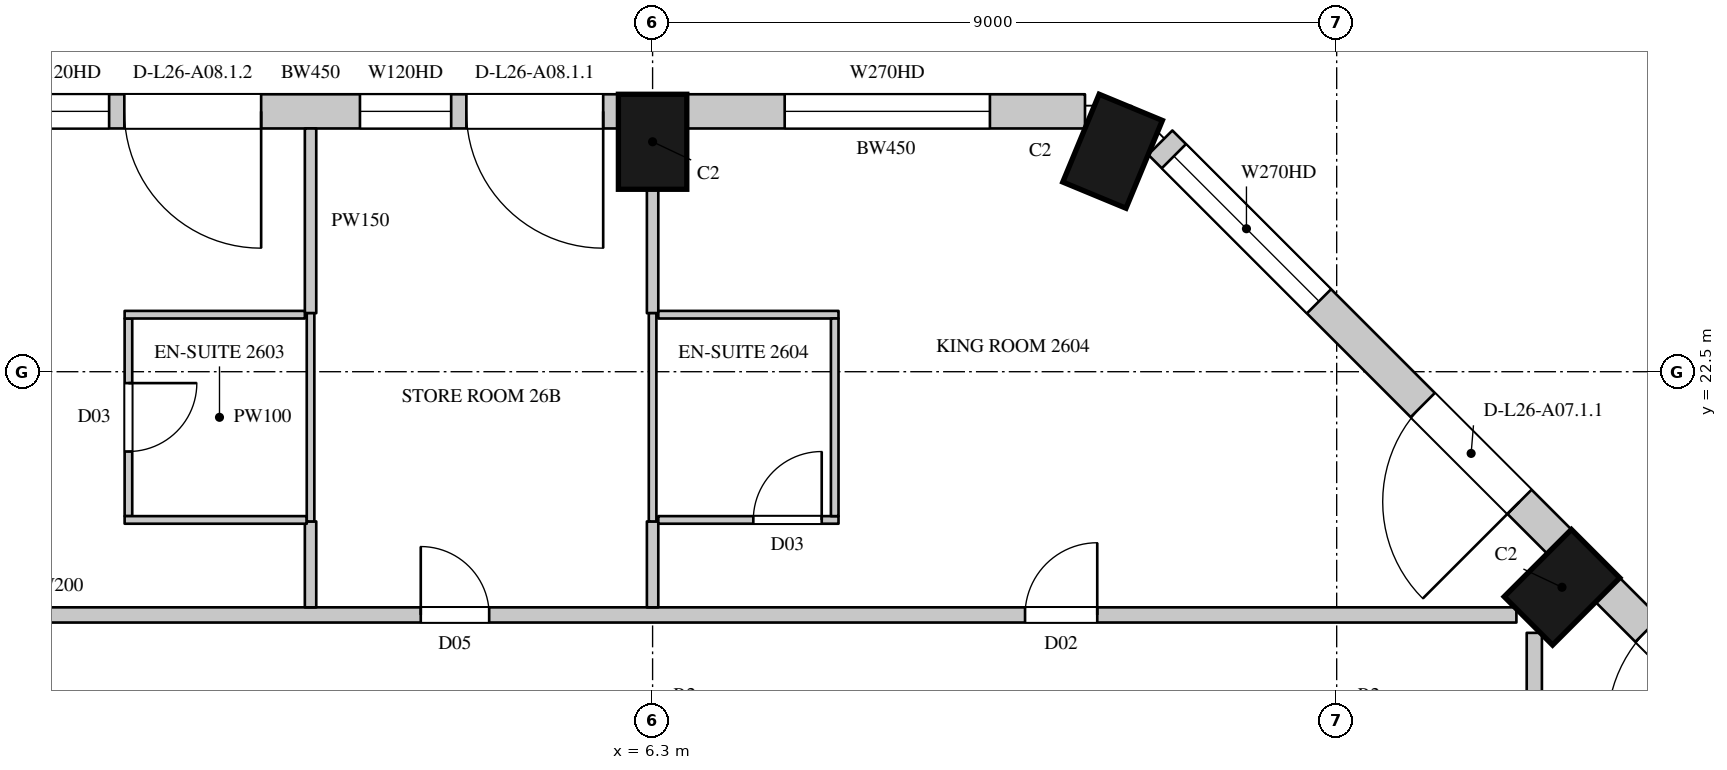
"""IFC4 building model, lengths in metres.
Left out: names, types, materials, properties, quantities, classifications, styles, units other than length and angle.
Written with IfcOpenShell. Run it as: python <this file> out.ifc"""

import sys

from ifc_helpers import new_model, si_unit, direction, frame, frame_2d, origin, origin_2d, place, context, subcontext, project, spatial, rectangle, extrude, element, fill, save


model = new_model("IFC4")
c1 = context("Model", 3, precision=1e-05, world=origin(), true_north=direction((0.0, 1.0)))
c2 = subcontext(c1, "Body", "Model", "MODEL_VIEW")
j1 = project(units=[si_unit("LENGTHUNIT", "METRE"), si_unit("PLANEANGLEUNIT", "RADIAN")], contexts=[c1])
p1 = place(None, origin())
s1 = spatial("IfcSite", under=j1, at=p1, CompositionType="ELEMENT")
p2 = place(p1, origin())
s2 = spatial("IfcBuilding", under=s1, at=p2, CompositionType="ELEMENT")
p3 = place(p2, frame((0.0, 0.0, 123.9)))
s3 = spatial("IfcBuildingStorey", under=s2, at=p3, CompositionType="ELEMENT", Elevation=123.9)
for number, where, z_axis, x_axis in (
    (1, (18.264, 19.664, 0.0), (0.0, 0.0, 1.0), (-0.707, 0.707, 0.0)),
    (2, (12.352, 25.4, 0.0), (0.0, 0.0, 1.0), (-0.924, 0.383, 0.0)),
    (3, (6.3, 25.525, 0.0), (0.0, 0.0, 1.0), (-1.0, 0.0, 0.0)),
):
    element("IfcColumn", number, at=place(p3, frame(where, z_axis=z_axis, x_axis=x_axis)), inside=s3, PredefinedType="COLUMN", context=c2, shape_type="SweptSolid", body=[
        extrude(rectangle(XDim=0.9, YDim=1.25, at=origin_2d()), origin(), (0.0, 0.0, 1.0), 3.6),
    ])
p4 = place(p3, frame((24.115, 14.379, 0.0), z_axis=(0.0, 0.0, 1.0), x_axis=(-0.707106781187, 0.707106781187, 0.0)))
e4 = element("IfcWall", 4, at=p4, inside=s3, PredefinedType="SOLIDWALL", context=c2, shape_type="SweptSolid", body=[
    extrude(rectangle(XDim=7.424, YDim=0.45, at=frame_2d((3.712, 0.0))), origin(), (0.0, 0.0, 1.0), 3.3),
])
p5 = place(p4, frame((0.253, 0.0, 1.05)))
e5 = element("IfcOpeningElement", 5, at=p5, cuts=e4, PredefinedType="OPENING", context=c2, shape_type="SweptSolid", body=[
    extrude(rectangle(XDim=2.7, YDim=2.0, at=frame_2d((1.35, 1.0))), frame((0.0, 0.235, 0.0), z_axis=(0.0, -1.0, 0.0), x_axis=(1.0, 0.0, 0.0)), (0.0, 0.0, 1.0), 0.47),
])
p6 = place(p4, frame((4.884, 0.0, 0.0)))
e6 = element("IfcOpeningElement", 6, at=p6, cuts=e4, PredefinedType="OPENING", context=c2, shape_type="SweptSolid", body=[
    extrude(rectangle(XDim=1.8, YDim=2.4, at=frame_2d((0.9, 1.2))), frame((0.0, 0.235, 0.0), z_axis=(0.0, -1.0, 0.0), x_axis=(1.0, 0.0, 0.0)), (0.0, 0.0, 1.0), 0.47),
])
p7 = place(p3, frame((18.229, 20.265, 0.0), z_axis=(0.0, 0.0, 1.0), x_axis=(-0.707106781187, 0.707106781187, 0.0)))
e7 = element("IfcWall", 7, at=p7, inside=s3, PredefinedType="SOLIDWALL", context=c2, shape_type="SweptSolid", body=[
    extrude(rectangle(XDim=7.424, YDim=0.45, at=frame_2d((3.712, 0.0))), origin(), (0.0, 0.0, 1.0), 3.3),
])
p8 = place(p7, frame((0.74, 0.0, 0.0)))
e8 = element("IfcOpeningElement", 8, at=p8, cuts=e7, PredefinedType="OPENING", context=c2, shape_type="SweptSolid", body=[
    extrude(rectangle(XDim=1.8, YDim=2.4, at=frame_2d((0.9, 1.2))), frame((0.0, 0.235, 0.0), z_axis=(0.0, -1.0, 0.0), x_axis=(1.0, 0.0, 0.0)), (0.0, 0.0, 1.0), 0.47),
])
p9 = place(p7, frame((4.471, 0.0, 1.05)))
e9 = element("IfcOpeningElement", 9, at=p9, cuts=e7, PredefinedType="OPENING", context=c2, shape_type="SweptSolid", body=[
    extrude(rectangle(XDim=2.7, YDim=2.0, at=frame_2d((1.35, 1.0))), frame((0.0, 0.235, 0.0), z_axis=(0.0, -1.0, 0.0), x_axis=(1.0, 0.0, 0.0)), (0.0, 0.0, 1.0), 0.47),
])
p10 = place(p3, frame((11.989, 25.925, 0.0), z_axis=(0.0, 0.0, 1.0), x_axis=(-1.0, 0.0, 0.0)))
e10 = element("IfcWall", 10, at=p10, inside=s3, PredefinedType="SOLIDWALL", context=c2, shape_type="SweptSolid", body=[
    extrude(rectangle(XDim=5.239, YDim=0.45, at=frame_2d((2.619, 0.0))), origin(), (0.0, 0.0, 1.0), 3.3),
])
p11 = place(p10, frame((1.251, 0.0, 1.05)))
e11 = element("IfcOpeningElement", 11, at=p11, cuts=e10, PredefinedType="OPENING", context=c2, shape_type="SweptSolid", body=[
    extrude(rectangle(XDim=2.7, YDim=2.0, at=frame_2d((1.35, 1.0))), frame((0.0, 0.235, 0.0), z_axis=(0.0, -1.0, 0.0), x_axis=(1.0, 0.0, 0.0)), (0.0, 0.0, 1.0), 0.47),
])
p12 = place(p3, frame((5.85, 25.925, 0.0), z_axis=(0.0, 0.0, 1.0), x_axis=(-1.0, 0.0, 0.0)))
e12 = element("IfcWall", 12, at=p12, inside=s3, PredefinedType="SOLIDWALL", context=c2, shape_type="SweptSolid", body=[
    extrude(rectangle(XDim=8.1, YDim=0.45, at=frame_2d((4.05, 0.0))), origin(), (0.0, 0.0, 1.0), 3.3),
])
p13 = place(p12, frame((0.2, 0.0, 0.0)))
e13 = element("IfcOpeningElement", 13, at=p13, cuts=e12, PredefinedType="OPENING", context=c2, shape_type="SweptSolid", body=[
    extrude(rectangle(XDim=1.8, YDim=2.4, at=frame_2d((0.9, 1.2))), frame((0.0, 0.235, 0.0), z_axis=(0.0, -1.0, 0.0), x_axis=(1.0, 0.0, 0.0)), (0.0, 0.0, 1.0), 0.47),
])
p14 = place(p12, frame((2.2, 0.0, 1.05)))
e14 = element("IfcOpeningElement", 14, at=p14, cuts=e12, PredefinedType="OPENING", context=c2, shape_type="SweptSolid", body=[
    extrude(rectangle(XDim=1.2, YDim=2.0, at=frame_2d((0.6, 1.0))), frame((0.0, 0.235, 0.0), z_axis=(0.0, -1.0, 0.0), x_axis=(1.0, 0.0, 0.0)), (0.0, 0.0, 1.0), 0.47),
])
p15 = place(p12, frame((4.7, 0.0, 0.0)))
e15 = element("IfcOpeningElement", 15, at=p15, cuts=e12, PredefinedType="OPENING", context=c2, shape_type="SweptSolid", body=[
    extrude(rectangle(XDim=1.8, YDim=2.4, at=frame_2d((0.9, 1.2))), frame((0.0, 0.235, 0.0), z_axis=(0.0, -1.0, 0.0), x_axis=(1.0, 0.0, 0.0)), (0.0, 0.0, 1.0), 0.47),
])
p16 = place(p12, frame((6.7, 0.0, 1.05)))
e16 = element("IfcOpeningElement", 16, at=p16, cuts=e12, PredefinedType="OPENING", context=c2, shape_type="SweptSolid", body=[
    extrude(rectangle(XDim=1.2, YDim=2.0, at=frame_2d((0.6, 1.0))), frame((0.0, 0.235, 0.0), z_axis=(0.0, -1.0, 0.0), x_axis=(1.0, 0.0, 0.0)), (0.0, 0.0, 1.0), 0.47),
])
p17 = place(p3, frame((19.937, 20.078, 0.0), z_axis=(0.0, 0.0, 1.0), x_axis=(-0.707106781187, 0.707106781187, 0.0)))
e17 = element("IfcWall", 17, at=p17, inside=s3, PredefinedType="SOLIDWALL", context=c2, shape_type="SweptSolid", body=[
    extrude(rectangle(XDim=1.781, YDim=0.45, at=frame_2d((0.89, 0.0))), origin(), (0.0, 0.0, 1.0), 0.6),
])
p18 = place(p3, frame((16.486, 23.529, 0.0), z_axis=(0.0, 0.0, 1.0), x_axis=(-0.707022305137, 0.707191247145, 0.0)))
e18 = element("IfcWall", 18, at=p18, inside=s3, PredefinedType="SOLIDWALL", context=c2, shape_type="SweptSolid", body=[
    extrude(rectangle(XDim=1.445, YDim=0.45, at=frame_2d((0.723, 0.0))), origin(), (0.0, 0.0, 1.0), 0.6),
])
p19 = place(p3, frame((-20.8, 19.3, 0.0), z_axis=(0.0, 0.0, 1.0), x_axis=(1.0, 0.0, 0.0)))
e19 = element("IfcWall", 19, at=p19, inside=s3, PredefinedType="PARTITIONING", context=c2, shape_type="SweptSolid", body=[
    extrude(rectangle(XDim=38.464, YDim=0.2, at=frame_2d((19.232, 0.0))), origin(), (0.0, 0.0, 1.0), 3.3),
])
p20 = place(p19, frame((24.05, 0.0, 0.0)))
e20 = element("IfcOpeningElement", 20, at=p20, cuts=e19, PredefinedType="OPENING", context=c2, shape_type="SweptSolid", body=[
    extrude(rectangle(XDim=0.9, YDim=2.2, at=frame_2d((0.45, 1.1))), frame((0.0, 0.11, 0.0), z_axis=(0.0, -1.0, 0.0), x_axis=(1.0, 0.0, 0.0)), (0.0, 0.0, 1.0), 0.22),
])
p21 = place(p19, frame((11.2, 0.0, 0.0)))
e21 = element("IfcOpeningElement", 21, at=p21, cuts=e19, PredefinedType="OPENING", context=c2, shape_type="SweptSolid", body=[
    extrude(rectangle(XDim=0.95, YDim=2.2, at=frame_2d((0.475, 1.1))), frame((0.0, 0.11, 0.0), z_axis=(0.0, -1.0, 0.0), x_axis=(1.0, 0.0, 0.0)), (0.0, 0.0, 1.0), 0.22),
])
p22 = place(p19, frame((15.05, 0.0, 0.0)))
e22 = element("IfcOpeningElement", 22, at=p22, cuts=e19, PredefinedType="OPENING", context=c2, shape_type="SweptSolid", body=[
    extrude(rectangle(XDim=0.95, YDim=2.2, at=frame_2d((0.475, 1.1))), frame((0.0, 0.11, 0.0), z_axis=(0.0, -1.0, 0.0), x_axis=(1.0, 0.0, 0.0)), (0.0, 0.0, 1.0), 0.22),
])
p23 = place(p19, frame((32.0, 0.0, 0.0)))
e23 = element("IfcOpeningElement", 23, at=p23, cuts=e19, PredefinedType="OPENING", context=c2, shape_type="SweptSolid", body=[
    extrude(rectangle(XDim=0.95, YDim=2.2, at=frame_2d((0.475, 1.1))), frame((0.0, 0.11, 0.0), z_axis=(0.0, -1.0, 0.0), x_axis=(1.0, 0.0, 0.0)), (0.0, 0.0, 1.0), 0.22),
])
p24 = place(p3, frame((17.9, 4.75, 0.0), z_axis=(0.0, 0.0, 1.0), x_axis=(0.0, 1.0, 0.0)))
e24 = element("IfcWall", 24, at=p24, inside=s3, PredefinedType="PARTITIONING", context=c2, shape_type="SweptSolid", body=[
    extrude(rectangle(XDim=14.314, YDim=0.2, at=frame_2d((7.157, 0.0))), origin(), (0.0, 0.0, 1.0), 3.3),
])
p25 = place(p24, frame((1.7, 0.0, 0.0)))
e25 = element("IfcOpeningElement", 25, at=p25, cuts=e24, PredefinedType="OPENING", context=c2, shape_type="SweptSolid", body=[
    extrude(rectangle(XDim=0.9, YDim=2.2, at=frame_2d((0.45, 1.1))), frame((0.0, 0.11, 0.0), z_axis=(0.0, -1.0, 0.0), x_axis=(1.0, 0.0, 0.0)), (0.0, 0.0, 1.0), 0.22),
])
p26 = place(p24, frame((10.2, 0.0, 0.0)))
e26 = element("IfcOpeningElement", 26, at=p26, cuts=e24, PredefinedType="OPENING", context=c2, shape_type="SweptSolid", body=[
    extrude(rectangle(XDim=0.95, YDim=2.2, at=frame_2d((0.475, 1.1))), frame((0.0, 0.11, 0.0), z_axis=(0.0, -1.0, 0.0), x_axis=(1.0, 0.0, 0.0)), (0.0, 0.0, 1.0), 0.22),
])
p27 = place(p3, frame((1.8, 19.4, 0.0), z_axis=(0.0, 0.0, 1.0), x_axis=(0.0, 1.0, 0.0)))
e27 = element("IfcWall", 27, at=p27, inside=s3, PredefinedType="PARTITIONING", context=c2, shape_type="SweptSolid", body=[
    extrude(rectangle(XDim=1.13, YDim=0.15, at=frame_2d((0.565, 0.0))), origin(), (0.0, 0.0, 1.0), 2.65),
])
p28 = place(p3, frame((1.8, 23.27, 0.0), z_axis=(0.0, 0.0, 1.0), x_axis=(0.0, 1.0, 0.0)))
e28 = element("IfcWall", 28, at=p28, inside=s3, PredefinedType="PARTITIONING", context=c2, shape_type="SweptSolid", body=[
    extrude(rectangle(XDim=2.43, YDim=0.15, at=frame_2d((1.215, 0.0))), origin(), (0.0, 0.0, 1.0), 2.65),
])
p29 = place(p3, frame((6.3, 19.4, 0.0), z_axis=(0.0, 0.0, 1.0), x_axis=(0.0, 1.0, 0.0)))
e29 = element("IfcWall", 29, at=p29, inside=s3, PredefinedType="PARTITIONING", context=c2, shape_type="SweptSolid", body=[
    extrude(rectangle(XDim=1.13, YDim=0.15, at=frame_2d((0.565, 0.0))), origin(), (0.0, 0.0, 1.0), 2.75),
])
p30 = place(p3, frame((6.3, 23.27, 0.0), z_axis=(0.0, 0.0, 1.0), x_axis=(0.0, 1.0, 0.0)))
e30 = element("IfcWall", 30, at=p30, inside=s3, PredefinedType="PARTITIONING", context=c2, shape_type="SweptSolid", body=[
    extrude(rectangle(XDim=1.63, YDim=0.15, at=frame_2d((0.815, 0.0))), origin(), (0.0, 0.0, 1.0), 2.75),
])
p31 = place(p3, frame((-0.596, 20.6, 0.0), z_axis=(0.0, 0.0, 1.0), x_axis=(0.0, 1.0, 0.0)))
e31 = element("IfcWall", 31, at=p31, inside=s3, PredefinedType="PARTITIONING", context=c2, shape_type="SweptSolid", body=[
    extrude(rectangle(XDim=2.6, YDim=0.1, at=frame_2d((1.3, 0.0))), origin(), (0.0, 0.0, 1.0), 3.3),
])
p32 = place(p31, frame((0.85, 0.0, 0.0)))
e32 = element("IfcOpeningElement", 32, at=p32, cuts=e31, PredefinedType="OPENING", context=c2, shape_type="SweptSolid", body=[
    extrude(rectangle(XDim=0.9, YDim=2.2, at=frame_2d((0.45, 1.1))), frame((0.0, 0.06, 0.0), z_axis=(0.0, -1.0, 0.0), x_axis=(1.0, 0.0, 0.0)), (0.0, 0.0, 1.0), 0.12),
])
p33 = place(p3, frame((-0.646, 20.55, 0.0), z_axis=(0.0, 0.0, 1.0), x_axis=(1.0, 0.0, 0.0)))
e33 = element("IfcWall", 33, at=p33, inside=s3, PredefinedType="PARTITIONING", context=c2, shape_type="SweptSolid", body=[
    extrude(rectangle(XDim=2.396, YDim=0.1, at=frame_2d((1.198, 0.0))), origin(), (0.0, 0.0, 1.0), 3.3),
])
p34 = place(p3, frame((-0.646, 23.25, 0.0), z_axis=(0.0, 0.0, 1.0), x_axis=(1.0, 0.0, 0.0)))
e34 = element("IfcWall", 34, at=p34, inside=s3, PredefinedType="PARTITIONING", context=c2, shape_type="SweptSolid", body=[
    extrude(rectangle(XDim=2.371, YDim=0.1, at=frame_2d((1.186, 0.0))), origin(), (0.0, 0.0, 1.0), 3.3),
])
p35 = place(p3, frame((1.8, 20.53, 0.0), z_axis=(0.0, 0.0, 1.0), x_axis=(0.0, 1.0, 0.0)))
e35 = element("IfcWall", 35, at=p35, inside=s3, PredefinedType="PARTITIONING", context=c2, shape_type="SweptSolid", body=[
    extrude(rectangle(XDim=2.74, YDim=0.1, at=frame_2d((1.37, 0.0))), origin(), (0.0, 0.0, 1.0), 2.65),
])
p36 = place(p3, frame((6.3, 20.53, 0.0), z_axis=(0.0, 0.0, 1.0), x_axis=(0.0, 1.0, 0.0)))
e36 = element("IfcWall", 36, at=p36, inside=s3, PredefinedType="PARTITIONING", context=c2, shape_type="SweptSolid", body=[
    extrude(rectangle(XDim=2.74, YDim=0.1, at=frame_2d((1.37, 0.0))), origin(), (0.0, 0.0, 1.0), 2.75),
])
p37 = place(p3, frame((6.375, 20.55, 0.0), z_axis=(0.0, 0.0, 1.0), x_axis=(1.0, 0.0, 0.0)))
e37 = element("IfcWall", 37, at=p37, inside=s3, PredefinedType="PARTITIONING", context=c2, shape_type="SweptSolid", body=[
    extrude(rectangle(XDim=2.371, YDim=0.1, at=frame_2d((1.186, 0.0))), origin(), (0.0, 0.0, 1.0), 3.3),
])
p38 = place(p37, frame((1.25, 0.0, 0.0)))
e38 = element("IfcOpeningElement", 38, at=p38, cuts=e37, PredefinedType="OPENING", context=c2, shape_type="SweptSolid", body=[
    extrude(rectangle(XDim=0.9, YDim=2.2, at=frame_2d((0.45, 1.1))), frame((0.0, 0.06, 0.0), z_axis=(0.0, -1.0, 0.0), x_axis=(1.0, 0.0, 0.0)), (0.0, 0.0, 1.0), 0.12),
])
p39 = place(p3, frame((6.375, 23.25, 0.0), z_axis=(0.0, 0.0, 1.0), x_axis=(1.0, 0.0, 0.0)))
e39 = element("IfcWall", 39, at=p39, inside=s3, PredefinedType="PARTITIONING", context=c2, shape_type="SweptSolid", body=[
    extrude(rectangle(XDim=2.371, YDim=0.1, at=frame_2d((1.186, 0.0))), origin(), (0.0, 0.0, 1.0), 3.3),
])
p40 = place(p3, frame((8.696, 20.6, 0.0), z_axis=(0.0, 0.0, 1.0), x_axis=(0.0, 1.0, 0.0)))
e40 = element("IfcWall", 40, at=p40, inside=s3, PredefinedType="PARTITIONING", context=c2, shape_type="SweptSolid", body=[
    extrude(rectangle(XDim=2.6, YDim=0.1, at=frame_2d((1.3, 0.0))), origin(), (0.0, 0.0, 1.0), 3.3),
])
p41 = place(p6, origin())
e41 = element("IfcDoor", 41, at=p41, inside=s3, OperationType="SLIDING_TO_LEFT", PredefinedType="DOOR", context=c2, shape_type="SweptSolid", body=[
    extrude(rectangle(XDim=1.8, YDim=2.4, at=frame_2d((0.9, 1.2))), frame((0.0, 0.13, 0.0), z_axis=(0.0, -1.0, 0.0), x_axis=(1.0, 0.0, 0.0)), (0.0, 0.0, 1.0), 0.05),
])
fill(e6, e41)
p42 = place(p8, origin())
e42 = element("IfcDoor", 42, at=p42, inside=s3, OperationType="SLIDING_TO_LEFT", PredefinedType="DOOR", context=c2, shape_type="SweptSolid", body=[
    extrude(rectangle(XDim=1.8, YDim=2.4, at=frame_2d((0.9, 1.2))), frame((0.0, 0.13, 0.0), z_axis=(0.0, -1.0, 0.0), x_axis=(1.0, 0.0, 0.0)), (0.0, 0.0, 1.0), 0.05),
])
fill(e8, e42)
p43 = place(p9, origin())
e43 = element("IfcWindow", 43, at=p43, inside=s3, PartitioningType="SINGLE_PANEL", PredefinedType="WINDOW", context=c2, shape_type="SweptSolid", body=[
    extrude(rectangle(XDim=2.7, YDim=2.0, at=frame_2d((1.35, 1.0))), frame((0.0, 0.135, 0.0), z_axis=(0.0, -1.0, 0.0), x_axis=(1.0, 0.0, 0.0)), (0.0, 0.0, 1.0), 0.06),
])
fill(e9, e43)
p44 = place(p11, origin())
e44 = element("IfcWindow", 44, at=p44, inside=s3, PartitioningType="SINGLE_PANEL", PredefinedType="WINDOW", context=c2, shape_type="SweptSolid", body=[
    extrude(rectangle(XDim=2.7, YDim=2.0, at=frame_2d((1.35, 1.0))), frame((0.0, 0.135, 0.0), z_axis=(0.0, -1.0, 0.0), x_axis=(1.0, 0.0, 0.0)), (0.0, 0.0, 1.0), 0.06),
])
fill(e11, e44)
p45 = place(p13, origin())
e45 = element("IfcDoor", 45, at=p45, inside=s3, OperationType="SLIDING_TO_LEFT", PredefinedType="DOOR", context=c2, shape_type="SweptSolid", body=[
    extrude(rectangle(XDim=1.8, YDim=2.4, at=frame_2d((0.9, 1.2))), frame((0.0, 0.13, 0.0), z_axis=(0.0, -1.0, 0.0), x_axis=(1.0, 0.0, 0.0)), (0.0, 0.0, 1.0), 0.05),
])
fill(e13, e45)
p46 = place(p14, origin())
e46 = element("IfcWindow", 46, at=p46, inside=s3, PartitioningType="SINGLE_PANEL", PredefinedType="WINDOW", context=c2, shape_type="SweptSolid", body=[
    extrude(rectangle(XDim=1.2, YDim=2.0, at=frame_2d((0.6, 1.0))), frame((0.0, 0.135, 0.0), z_axis=(0.0, -1.0, 0.0), x_axis=(1.0, 0.0, 0.0)), (0.0, 0.0, 1.0), 0.06),
])
fill(e14, e46)
p47 = place(p15, origin())
e47 = element("IfcDoor", 47, at=p47, inside=s3, OperationType="SLIDING_TO_LEFT", PredefinedType="DOOR", context=c2, shape_type="SweptSolid", body=[
    extrude(rectangle(XDim=1.8, YDim=2.4, at=frame_2d((0.9, 1.2))), frame((0.0, 0.13, 0.0), z_axis=(0.0, -1.0, 0.0), x_axis=(1.0, 0.0, 0.0)), (0.0, 0.0, 1.0), 0.05),
])
fill(e15, e47)
p48 = place(p16, origin())
e48 = element("IfcWindow", 48, at=p48, inside=s3, PartitioningType="SINGLE_PANEL", PredefinedType="WINDOW", context=c2, shape_type="SweptSolid", body=[
    extrude(rectangle(XDim=1.2, YDim=2.0, at=frame_2d((0.6, 1.0))), frame((0.0, 0.135, 0.0), z_axis=(0.0, -1.0, 0.0), x_axis=(1.0, 0.0, 0.0)), (0.0, 0.0, 1.0), 0.06),
])
fill(e16, e48)
p49 = place(p20, origin())
e49 = element("IfcDoor", 49, at=p49, inside=s3, OperationType="SINGLE_SWING_LEFT", PredefinedType="DOOR", context=c2, shape_type="SweptSolid", body=[
    extrude(rectangle(XDim=0.9, YDim=2.2, at=frame_2d((0.45, 1.1))), frame((0.0, 0.025, 0.0), z_axis=(0.0, -1.0, 0.0), x_axis=(1.0, 0.0, 0.0)), (0.0, 0.0, 1.0), 0.05),
])
fill(e20, e49)
p50 = place(p32, origin())
e50 = element("IfcDoor", 50, at=p50, inside=s3, OperationType="SINGLE_SWING_LEFT", PredefinedType="DOOR", context=c2, shape_type="SweptSolid", body=[
    extrude(rectangle(XDim=0.9, YDim=2.2, at=frame_2d((0.45, 1.1))), frame((0.0, 0.025, 0.0), z_axis=(0.0, -1.0, 0.0), x_axis=(1.0, 0.0, 0.0)), (0.0, 0.0, 1.0), 0.05),
])
fill(e32, e50)
p51 = place(p23, origin())
e51 = element("IfcDoor", 51, at=p51, inside=s3, OperationType="SINGLE_SWING_RIGHT", PredefinedType="DOOR", context=c2, shape_type="SweptSolid", body=[
    extrude(rectangle(XDim=0.95, YDim=2.2, at=frame_2d((0.475, 1.1))), frame((0.0, 0.025, 0.0), z_axis=(0.0, -1.0, 0.0), x_axis=(1.0, 0.0, 0.0)), (0.0, 0.0, 1.0), 0.05),
])
fill(e23, e51)
p52 = place(p38, origin())
e52 = element("IfcDoor", 52, at=p52, inside=s3, OperationType="SINGLE_SWING_RIGHT", PredefinedType="DOOR", context=c2, shape_type="SweptSolid", body=[
    extrude(rectangle(XDim=0.9, YDim=2.2, at=frame_2d((0.45, 1.1))), frame((0.0, 0.025, 0.0), z_axis=(0.0, -1.0, 0.0), x_axis=(1.0, 0.0, 0.0)), (0.0, 0.0, 1.0), 0.05),
])
fill(e38, e52)
save(model, sys.argv[1])
